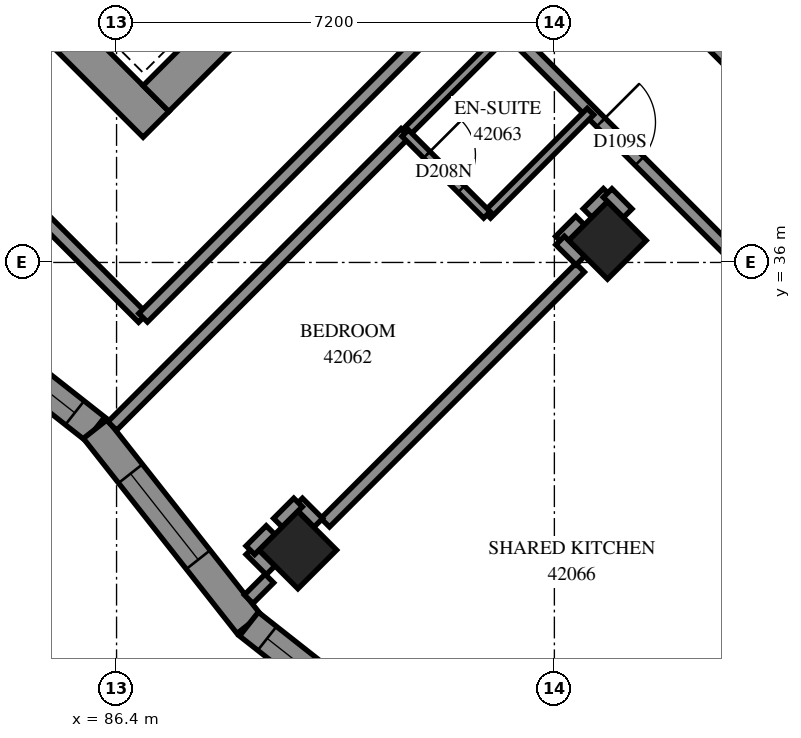
"""IFC4 building model, lengths in metres.
Left out: names, types, materials, properties, quantities, classifications, styles, units other than length and angle.
Written with IfcOpenShell. Run it as: python <this file> out.ifc"""

import sys

from ifc_helpers import new_model, si_unit, direction, frame, frame_2d, origin, origin_2d, place, context, subcontext, project, spatial, polyline, rectangle, outline, extrude, element, fill, save


model = new_model("IFC4")
c1 = context("Model", 3, precision=1e-05, world=origin(), true_north=direction((0.0, 1.0)))
c2 = subcontext(c1, "Body", "Model", "MODEL_VIEW")
j1 = project(units=[si_unit("LENGTHUNIT", "METRE"), si_unit("PLANEANGLEUNIT", "RADIAN")], contexts=[c1])
p1 = place(None, origin())
s1 = spatial("IfcSite", under=j1, at=p1, CompositionType="ELEMENT")
p2 = place(p1, origin())
s2 = spatial("IfcBuilding", under=s1, at=p2, CompositionType="ELEMENT")
p3 = place(p2, frame((0.0, 0.0, 155.8)))
s3 = spatial("IfcBuildingStorey", under=s2, at=p3, CompositionType="ELEMENT", Elevation=155.8)
for number, where, z_axis, x_axis in (
    (1, (94.474, 36.362, 0.0), (0.0, 0.0, 1.0), (0.707, -0.707, 0.0)),
    (2, (89.382, 31.271, 0.0), (0.0, 0.0, 1.0), (0.707, -0.707, 0.0)),
):
    element("IfcColumn", number, at=place(p3, frame(where, z_axis=z_axis, x_axis=x_axis)), inside=s3, PredefinedType="COLUMN", context=c2, shape_type="SweptSolid", body=[
        extrude(rectangle(XDim=0.9, YDim=0.9, at=origin_2d()), origin(), (0.0, 0.0, 1.0), 3.1),
    ])
p4 = place(p3, frame((76.018, 49.302, -0.3), z_axis=(0.0, 0.0, 1.0), x_axis=(0.7071067812, -0.7071067812, 0.0)))
e3 = element("IfcWall", 3, at=p4, inside=s3, PredefinedType="SHEAR", context=c2, shape_type="SweptSolid", body=[
    extrude(rectangle(XDim=15.6, YDim=0.6, at=frame_2d((7.8, 0.0))), origin(), (0.0, 0.0, 1.0), 2.7),
])
p5 = place(p3, frame((87.049, 38.695, -0.3), z_axis=(0.0, 0.0, 1.0), x_axis=(0.7071067812, 0.7071067812, 0.0)))
e4 = element("IfcWall", 4, at=p5, inside=s3, PredefinedType="SHEAR", context=c2, shape_type="SweptSolid", body=[
    extrude(rectangle(XDim=14.4, YDim=0.6, at=frame_2d((7.2, 0.0))), origin(), (0.0, 0.0, 1.0), 2.7),
])
p6 = place(p5, frame((4.55, 0.0, 0.3)))
e5 = element("IfcOpeningElement", 5, at=p6, cuts=e4, PredefinedType="OPENING", context=c2, shape_type="SweptSolid", body=[
    extrude(rectangle(XDim=1.1, YDim=2.1, at=frame_2d((0.55, 1.05))), frame((0.0, 0.31, 0.0), z_axis=(0.0, -1.0, 0.0), x_axis=(1.0, 0.0, 0.0)), (0.0, 0.0, 1.0), 0.62),
])
p7 = place(p5, frame((11.35, 0.0, 0.3)))
e6 = element("IfcOpeningElement", 6, at=p7, cuts=e4, PredefinedType="OPENING", context=c2, shape_type="SweptSolid", body=[
    extrude(rectangle(XDim=1.1, YDim=2.1, at=frame_2d((0.55, 1.05))), frame((0.0, 0.31, 0.0), z_axis=(0.0, -1.0, 0.0), x_axis=(1.0, 0.0, 0.0)), (0.0, 0.0, 1.0), 0.62),
])
p8 = place(p3, frame((82.844, 35.787, 0.0), z_axis=(0.0, 0.0, 1.0), x_axis=(0.7856464341, -0.6186757476, 0.0)))
e7 = element("IfcWall", 7, at=p8, inside=s3, PredefinedType="SOLIDWALL", context=c2, shape_type="SweptSolid", body=[
    extrude(outline(polyline([(-0.03, -0.25), (4.053, -0.25), (4.112, 0.25), (0.03, 0.25), (-0.03, -0.25)])), origin(), (0.0, 0.0, 1.0), 3.1),
])
p9 = place(p8, frame((0.852, 0.0, 0.45)))
e8 = element("IfcOpeningElement", 8, at=p9, cuts=e7, PredefinedType="OPENING", context=c2, shape_type="SweptSolid", body=[
    extrude(rectangle(XDim=2.8, YDim=2.5, at=frame_2d((1.4, 1.25))), frame((0.0, 0.26, 0.0), z_axis=(0.0, -1.0, 0.0), x_axis=(1.0, 0.0, 0.0)), (0.0, 0.0, 1.0), 0.52),
])
p10 = place(p3, frame((86.051, 33.261, 0.0), z_axis=(0.0, 0.0, 1.0), x_axis=(0.6186757476, -0.7856464341, 0.0)))
e9 = element("IfcWall", 9, at=p10, inside=s3, PredefinedType="SOLIDWALL", context=c2, shape_type="SweptSolid", body=[
    extrude(outline(polyline([(0.03, -0.25), (4.112, -0.25), (4.053, 0.25), (-0.03, 0.25), (0.03, -0.25)])), origin(), (0.0, 0.0, 1.0), 3.1),
])
p11 = place(p10, frame((0.934, 0.0, 0.7)))
e10 = element("IfcOpeningElement", 10, at=p11, cuts=e9, PredefinedType="OPENING", context=c2, shape_type="SweptSolid", body=[
    extrude(rectangle(XDim=1.8, YDim=2.2, at=frame_2d((0.9, 1.1))), frame((0.0, 0.26, 0.0), z_axis=(0.0, -1.0, 0.0), x_axis=(1.0, 0.0, 0.0)), (0.0, 0.0, 1.0), 0.52),
])
p12 = place(p3, frame((88.577, 30.053, 0.0), z_axis=(0.0, 0.0, 1.0), x_axis=(0.7856392777, -0.6186848353, 0.0)))
e11 = element("IfcWall", 11, at=p12, inside=s3, PredefinedType="SOLIDWALL", context=c2, shape_type="SweptSolid", body=[
    extrude(outline(polyline([(-0.03, -0.25), (4.053, -0.25), (4.149, 0.25), (0.03, 0.25), (-0.03, -0.25)])), origin(), (0.0, 0.0, 1.0), 3.1),
])
p13 = place(p12, frame((0.381, 0.0, 0.45)))
e12 = element("IfcOpeningElement", 12, at=p13, cuts=e11, PredefinedType="OPENING", context=c2, shape_type="SweptSolid", body=[
    extrude(rectangle(XDim=2.8, YDim=2.5, at=frame_2d((1.4, 1.25))), frame((0.0, 0.26, 0.0), z_axis=(0.0, -1.0, 0.0), x_axis=(1.0, 0.0, 0.0)), (0.0, 0.0, 1.0), 0.52),
])
p14 = place(p3, frame((92.209, 40.459, 0.0), z_axis=(0.0, 0.0, 1.0), x_axis=(0.7071067812, -0.7071067812, 0.0)))
e13 = element("IfcWall", 13, at=p14, inside=s3, PredefinedType="PARTITIONING", context=c2, shape_type="SweptSolid", body=[
    extrude(rectangle(XDim=11.698, YDim=0.2, at=frame_2d((5.849, 0.0))), origin(), (0.0, 0.0, 1.0), 3.1),
])
p15 = place(p14, frame((3.047, 0.0, 0.0)))
e14 = element("IfcOpeningElement", 14, at=p15, cuts=e13, PredefinedType="OPENING", context=c2, shape_type="SweptSolid", body=[
    extrude(rectangle(XDim=0.9, YDim=2.1, at=frame_2d((0.45, 1.05))), frame((0.0, 0.11, 0.0), z_axis=(0.0, -1.0, 0.0), x_axis=(1.0, 0.0, 0.0)), (0.0, 0.0, 1.0), 0.22),
])
p16 = place(p14, frame((8.056, 0.0, 0.0)))
e15 = element("IfcOpeningElement", 15, at=p16, cuts=e13, PredefinedType="OPENING", context=c2, shape_type="SweptSolid", body=[
    extrude(rectangle(XDim=1.0, YDim=2.1, at=frame_2d((0.5, 1.05))), frame((0.0, 0.11, 0.0), z_axis=(0.0, -1.0, 0.0), x_axis=(1.0, 0.0, 0.0)), (0.0, 0.0, 1.0), 0.22),
])
p17 = place(p3, frame((80.423, 41.497, 0.0), z_axis=(0.0, 0.0, 1.0), x_axis=(0.7071067812, -0.7071067812, 0.0)))
e16 = element("IfcWall", 16, at=p17, inside=s3, PredefinedType="PARTITIONING", context=c2, shape_type="SweptSolid", body=[
    extrude(rectangle(XDim=9.065, YDim=0.2, at=frame_2d((4.532, 0.0))), origin(), (0.0, 0.0, 1.0), 3.1),
])
p18 = place(p3, frame((86.837, 35.091, 0.0), z_axis=(0.0, 0.0, 1.0), x_axis=(0.7071067812, 0.7071067812, 0.0)))
e17 = element("IfcWall", 17, at=p18, inside=s3, PredefinedType="PARTITIONING", context=c2, shape_type="SweptSolid", body=[
    extrude(rectangle(XDim=7.597, YDim=0.2, at=frame_2d((3.799, 0.0))), origin(), (0.0, 0.0, 1.0), 3.1),
])
p19 = place(p18, frame((6.395, 0.0, 0.0)))
e18 = element("IfcOpeningElement", 18, at=p19, cuts=e17, PredefinedType="OPENING", context=c2, shape_type="SweptSolid", body=[
    extrude(rectangle(XDim=1.0, YDim=2.1, at=frame_2d((0.5, 1.05))), frame((0.0, 0.11, 0.0), z_axis=(0.0, -1.0, 0.0), x_axis=(1.0, 0.0, 0.0)), (0.0, 0.0, 1.0), 0.22),
])
p20 = place(p3, frame((86.33, 33.311, 0.0), z_axis=(0.0, 0.0, 1.0), x_axis=(0.7071067812, 0.7071067812, 0.0)))
e19 = element("IfcWall", 19, at=p20, inside=s3, PredefinedType="PARTITIONING", context=c2, shape_type="SweptSolid", body=[
    extrude(rectangle(XDim=6.816, YDim=0.2, at=frame_2d((3.408, 0.0))), origin(), (0.0, 0.0, 1.0), 3.1),
])
p21 = place(p3, frame((89.831, 31.721, 0.0), z_axis=(0.0, 0.0, 1.0), x_axis=(0.7071067812, 0.7071067812, 0.0)))
e20 = element("IfcWall", 20, at=p21, inside=s3, PredefinedType="PARTITIONING", context=c2, shape_type="SweptSolid", body=[
    extrude(rectangle(XDim=5.928, YDim=0.2, at=frame_2d((2.964, 0.0))), origin(), (0.0, 0.0, 1.0), 3.1),
])
p22 = place(p3, frame((94.923, 26.631, 0.0), z_axis=(0.0, 0.0, 1.0), x_axis=(0.7071067812, 0.7071067812, 0.0)))
e21 = element("IfcWall", 21, at=p22, inside=s3, PredefinedType="PARTITIONING", context=c2, shape_type="SweptSolid", body=[
    extrude(rectangle(XDim=5.926, YDim=0.2, at=frame_2d((2.963, 0.0))), origin(), (0.0, 0.0, 1.0), 2.6),
])
p23 = place(p3, frame((94.399, 41.379, 0.0), z_axis=(0.0, 0.0, 1.0), x_axis=(0.7071067812, -0.7071067812, 0.0)))
e22 = element("IfcWall", 22, at=p23, inside=s3, PredefinedType="PARTITIONING", context=c2, shape_type="SweptSolid", body=[
    extrude(rectangle(XDim=3.601, YDim=0.2, at=frame_2d((1.8, 0.0))), origin(), (0.0, 0.0, 1.0), 3.1),
])
p24 = place(p23, frame((0.35, 0.0, 0.0)))
e23 = element("IfcOpeningElement", 23, at=p24, cuts=e22, PredefinedType="OPENING", context=c2, shape_type="SweptSolid", body=[
    extrude(rectangle(XDim=0.9, YDim=2.1, at=frame_2d((0.45, 1.05))), frame((0.0, 0.11, 0.0), z_axis=(0.0, -1.0, 0.0), x_axis=(1.0, 0.0, 0.0)), (0.0, 0.0, 1.0), 0.22),
])
for number, where, z_axis, x_axis in (
    (24, (91.152, 38.128, 0.0), (0.0, 0.0, 1.0), (0.708, 0.707, 0.0)),
    (25, (92.497, 36.783, 0.0), (0.0, 0.0, 1.0), (0.707, 0.708, 0.0)),
):
    element("IfcWall", number, at=place(p3, frame(where, z_axis=z_axis, x_axis=x_axis)), inside=s3, PredefinedType="PARTITIONING", context=c2, shape_type="SweptSolid", body=[
        extrude(rectangle(XDim=2.4, YDim=0.15, at=frame_2d((1.2, 0.0))), origin(), (0.0, 0.0, 1.0), 3.1),
    ])
p25 = place(p3, frame((91.147, 38.127, 0.0), z_axis=(0.0, 0.0, 1.0), x_axis=(0.7071067812, -0.7071067812, 0.0)))
e26 = element("IfcWall", 26, at=p25, inside=s3, PredefinedType="PARTITIONING", context=c2, shape_type="SweptSolid", body=[
    extrude(rectangle(XDim=1.901, YDim=0.15, at=frame_2d((0.95, 0.0))), origin(), (0.0, 0.0, 1.0), 3.1),
])
p26 = place(p25, frame((0.502, 0.0, 0.0)))
e27 = element("IfcOpeningElement", 27, at=p26, cuts=e26, PredefinedType="OPENING", context=c2, shape_type="SweptSolid", body=[
    extrude(rectangle(XDim=0.8, YDim=2.1, at=frame_2d((0.4, 1.05))), frame((0.0, 0.085, 0.0), z_axis=(0.0, -1.0, 0.0), x_axis=(1.0, 0.0, 0.0)), (0.0, 0.0, 1.0), 0.17),
])
for number, where, z_axis, x_axis in (
    (28, (94.145, 36.813, 0.0), (0.0, 0.0, 1.0), (0.707, 0.707, 0.0)),
    (29, (88.6, 31.268, 0.0), (0.0, 0.0, 1.0), (0.707, -0.707, 0.0)),
    (30, (89.386, 32.052, 0.0), (0.0, 0.0, 1.0), (0.707, -0.707, 0.0)),
    (31, (88.6, 31.268, 0.0), (0.0, 0.0, 1.0), (0.707, 0.707, 0.0)),
    (32, (89.053, 31.721, 0.0), (0.0, 0.0, 1.0), (0.707, 0.707, 0.0)),
    (33, (93.691, 36.359, 0.0), (0.0, 0.0, 1.0), (0.707, 0.707, 0.0)),
):
    element("IfcWall", number, at=place(p3, frame(where, z_axis=z_axis, x_axis=x_axis)), inside=s3, PredefinedType="PARTITIONING", context=c2, shape_type="SweptSolid", body=[
        extrude(rectangle(XDim=0.469, YDim=0.2, at=frame_2d((0.235, 0.0))), origin(), (0.0, 0.0, 1.0), 3.1),
    ])
for number, where, z_axis, x_axis in (
    (34, (94.476, 37.142, 0.0), (0.0, 0.0, 1.0), (0.705, -0.709, 0.0)),
    (35, (93.695, 36.361, 0.0), (0.0, 0.0, 1.0), (0.709, -0.705, 0.0)),
):
    element("IfcWall", number, at=place(p3, frame(where, z_axis=z_axis, x_axis=x_axis)), inside=s3, PredefinedType="PARTITIONING", context=c2, shape_type="SweptSolid", body=[
        extrude(rectangle(XDim=0.468, YDim=0.2, at=frame_2d((0.234, 0.0))), origin(), (0.0, 0.0, 1.0), 3.1),
    ])
p27 = place(p3, frame((88.573, 30.463, 0.0), z_axis=(0.0, 0.0, 1.0), x_axis=(0.7071067812, 0.7071067812, 0.0)))
e36 = element("IfcWall", 36, at=p27, inside=s3, PredefinedType="PARTITIONING", context=c2, shape_type="SweptSolid", body=[
    extrude(rectangle(XDim=0.481, YDim=0.2, at=frame_2d((0.241, 0.0))), origin(), (0.0, 0.0, 1.0), 3.1),
])
p28 = place(p9, origin())
e37 = element("IfcWindow", 37, at=p28, inside=s3, PartitioningType="SINGLE_PANEL", PredefinedType="WINDOW", context=c2, shape_type="SweptSolid", body=[
    extrude(rectangle(XDim=2.8, YDim=2.5, at=frame_2d((1.4, 1.25))), frame((0.0, 0.18, 0.0), z_axis=(0.0, -1.0, 0.0), x_axis=(1.0, 0.0, 0.0)), (0.0, 0.0, 1.0), 0.06),
])
fill(e8, e37)
p29 = place(p13, origin())
e38 = element("IfcWindow", 38, at=p29, inside=s3, PartitioningType="SINGLE_PANEL", PredefinedType="WINDOW", context=c2, shape_type="SweptSolid", body=[
    extrude(rectangle(XDim=2.8, YDim=2.5, at=frame_2d((1.4, 1.25))), frame((0.0, 0.18, 0.0), z_axis=(0.0, -1.0, 0.0), x_axis=(1.0, 0.0, 0.0)), (0.0, 0.0, 1.0), 0.06),
])
fill(e12, e38)
p30 = place(p15, origin())
e39 = element("IfcDoor", 39, at=p30, inside=s3, OperationType="SINGLE_SWING_LEFT", PredefinedType="DOOR", context=c2, shape_type="SweptSolid", body=[
    extrude(rectangle(XDim=0.9, YDim=2.1, at=frame_2d((0.45, 1.05))), frame((0.0, 0.025, 0.0), z_axis=(0.0, -1.0, 0.0), x_axis=(1.0, 0.0, 0.0)), (0.0, 0.0, 1.0), 0.05),
])
fill(e14, e39)
p31 = place(p26, origin())
e40 = element("IfcDoor", 40, at=p31, inside=s3, OperationType="SINGLE_SWING_RIGHT", PredefinedType="DOOR", context=c2, shape_type="SweptSolid", body=[
    extrude(rectangle(XDim=0.8, YDim=2.1, at=frame_2d((0.4, 1.05))), frame((0.0, 0.025, 0.0), z_axis=(0.0, -1.0, 0.0), x_axis=(1.0, 0.0, 0.0)), (0.0, 0.0, 1.0), 0.05),
])
fill(e27, e40)
p32 = place(p11, origin())
e41 = element("IfcWindow", 41, at=p32, inside=s3, PartitioningType="SINGLE_PANEL", PredefinedType="WINDOW", context=c2, shape_type="SweptSolid", body=[
    extrude(rectangle(XDim=1.8, YDim=2.2, at=frame_2d((0.9, 1.1))), frame((0.0, 0.18, 0.0), z_axis=(0.0, -1.0, 0.0), x_axis=(1.0, 0.0, 0.0)), (0.0, 0.0, 1.0), 0.06),
])
fill(e10, e41)
save(model, sys.argv[1])
